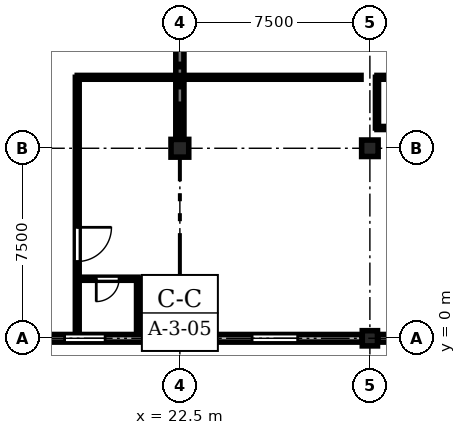
"""IFC4 building model, lengths in metres.
Left out: names, types, materials, properties, quantities, classifications, styles, units other than length and angle.
Written with IfcOpenShell. Run it as: python <this file> out.ifc"""

import sys

from ifc_helpers import new_model, si_unit, direction, frame, frame_2d, origin, origin_2d, place, context, subcontext, project, spatial, rectangle, circle, extrude, element, fill, save


model = new_model("IFC4")
c1 = context("Model", 3, precision=1e-05, world=origin(), true_north=direction((0.0, 1.0)))
c2 = subcontext(c1, "Body", "Model", "MODEL_VIEW")
j1 = project(units=[si_unit("LENGTHUNIT", "METRE"), si_unit("PLANEANGLEUNIT", "RADIAN")], contexts=[c1])
p1 = place(None, origin())
s1 = spatial("IfcSite", under=j1, at=p1, CompositionType="ELEMENT")
p2 = place(p1, origin())
s2 = spatial("IfcBuilding", under=s1, at=p2, CompositionType="ELEMENT")
p3 = place(p2, frame((0.0, 0.0, 17.85)))
s3 = spatial("IfcBuildingStorey", under=s2, at=p3, CompositionType="ELEMENT", Elevation=17.85)
p4 = place(p3, frame((22.5, 0.0, 0.0), z_axis=(0.0, 0.0, 1.0), x_axis=(1.0, 0.0, 0.0)))
e1 = element("IfcColumn", 1, at=p4, inside=s3, PredefinedType="COLUMN", context=c2, shape_type="SweptSolid", body=[
    extrude(circle(Radius=0.3, at=origin_2d()), origin(), (0.0, 0.0, 1.0), 4.05),
])
p5 = place(p3, frame((22.5, 7.5, 0.0), z_axis=(0.0, 0.0, 1.0), x_axis=(1.0, 0.0, 0.0)))
e2 = element("IfcColumn", 2, at=p5, inside=s3, PredefinedType="COLUMN", context=c2, shape_type="SweptSolid", body=[
    extrude(rectangle(XDim=0.7, YDim=0.7, at=origin_2d()), origin(), (0.0, 0.0, 1.0), 4.05),
])
p6 = place(p3, frame((30.0, 0.0, 0.0), z_axis=(0.0, 0.0, 1.0), x_axis=(1.0, 0.0, 0.0)))
e3 = element("IfcColumn", 3, at=p6, inside=s3, PredefinedType="COLUMN", context=c2, shape_type="SweptSolid", body=[
    extrude(rectangle(XDim=0.6, YDim=0.6, at=origin_2d()), origin(), (0.0, 0.0, 1.0), 4.05),
])
p7 = place(p3, frame((30.0, 7.5, 0.0), z_axis=(0.0, 0.0, 1.0), x_axis=(1.0, 0.0, 0.0)))
e4 = element("IfcColumn", 4, at=p7, inside=s3, PredefinedType="COLUMN", context=c2, shape_type="SweptSolid", body=[
    extrude(rectangle(XDim=0.65, YDim=0.65, at=origin_2d()), origin(), (0.0, 0.0, 1.0), 4.05),
])
p8 = place(p3, frame((22.5, 7.95, 0.0), z_axis=(0.0, 0.0, 1.0), x_axis=(0.0, 1.0, 0.0)))
e5 = element("IfcWall", 5, at=p8, inside=s3, PredefinedType="SHEAR", context=c2, shape_type="SweptSolid", body=[
    extrude(rectangle(XDim=6.6, YDim=0.32, at=frame_2d((3.3, 0.0))), origin(), (0.0, 0.0, 1.0), 3.22),
])
p9 = place(p3, frame((22.19, 0.0, 0.0), z_axis=(0.0, 0.0, 1.0), x_axis=(-1.0, 0.0, 0.0)))
e6 = element("IfcWall", 6, at=p9, inside=s3, PredefinedType="STANDARD", context=c2, shape_type="SweptSolid", body=[
    extrude(rectangle(XDim=6.88, YDim=0.3, at=frame_2d((3.44, 0.0))), origin(), (0.0, 0.0, 1.0), 3.17),
])
p10 = place(p9, frame((2.64, 0.0, 0.9)))
e7 = element("IfcOpeningElement", 7, at=p10, cuts=e6, PredefinedType="OPENING", context=c2, shape_type="SweptSolid", body=[
    extrude(rectangle(XDim=1.6, YDim=1.8, at=frame_2d((0.8, 0.9))), frame((0.0, 0.16, 0.0), z_axis=(0.0, -1.0, 0.0), x_axis=(1.0, 0.0, 0.0)), (0.0, 0.0, 1.0), 0.32),
])
p11 = place(p3, frame((29.69, 0.0, 0.0), z_axis=(0.0, 0.0, 1.0), x_axis=(-1.0, 0.0, 0.0)))
e8 = element("IfcWall", 8, at=p11, inside=s3, PredefinedType="STANDARD", context=c2, shape_type="SweptSolid", body=[
    extrude(rectangle(XDim=6.88, YDim=0.3, at=frame_2d((3.44, 0.0))), origin(), (0.0, 0.0, 1.0), 3.17),
])
p12 = place(p11, frame((2.54, 0.0, 0.9)))
e9 = element("IfcOpeningElement", 9, at=p12, cuts=e8, PredefinedType="OPENING", context=c2, shape_type="SweptSolid", body=[
    extrude(rectangle(XDim=1.8, YDim=1.8, at=frame_2d((0.9, 0.9))), frame((0.0, 0.16, 0.0), z_axis=(0.0, -1.0, 0.0), x_axis=(1.0, 0.0, 0.0)), (0.0, 0.0, 1.0), 0.32),
])
p13 = place(p3, frame((37.19, 0.0, 0.0), z_axis=(0.0, 0.0, 1.0), x_axis=(-1.0, 0.0, 0.0)))
e10 = element("IfcWall", 10, at=p13, inside=s3, PredefinedType="STANDARD", context=c2, shape_type="SweptSolid", body=[
    extrude(rectangle(XDim=6.88, YDim=0.3, at=frame_2d((3.44, 0.0))), origin(), (0.0, 0.0, 1.0), 3.17),
])
p14 = place(p13, frame((2.54, 0.0, 0.9)))
e11 = element("IfcOpeningElement", 11, at=p14, cuts=e10, PredefinedType="OPENING", context=c2, shape_type="SweptSolid", body=[
    extrude(rectangle(XDim=1.8, YDim=1.99, at=frame_2d((0.9, 0.995))), frame((0.0, 0.16, 0.0), z_axis=(0.0, -1.0, 0.0), x_axis=(1.0, 0.0, 0.0)), (0.0, 0.0, 1.0), 0.32),
])
p15 = place(p3, frame((18.45, 10.3, 0.0), z_axis=(0.0, 0.0, 1.0), x_axis=(0.0, -1.0, 0.0)))
e12 = element("IfcWall", 12, at=p15, inside=s3, PredefinedType="PARTITIONING", context=c2, shape_type="SweptSolid", body=[
    extrude(rectangle(XDim=9.95, YDim=0.15, at=frame_2d((4.975, 0.0))), origin(), (0.0, 0.0, 1.0), 3.755),
])
p16 = place(p15, frame((5.92, 0.0, 0.0)))
e13 = element("IfcOpeningElement", 13, at=p16, cuts=e12, PredefinedType="OPENING", context=c2, shape_type="SweptSolid", body=[
    extrude(rectangle(XDim=1.35, YDim=2.25, at=frame_2d((0.675, 1.125))), frame((0.0, 0.085, 0.0), z_axis=(0.0, -1.0, 0.0), x_axis=(1.0, 0.0, 0.0)), (0.0, 0.0, 1.0), 0.17),
])
p17 = place(p3, frame((20.85, 2.35, 0.0), z_axis=(0.0, 0.0, 1.0), x_axis=(-1.0, 0.0, 0.0)))
e14 = element("IfcWall", 14, at=p17, inside=s3, PredefinedType="PARTITIONING", context=c2, shape_type="SweptSolid", body=[
    extrude(rectangle(XDim=2.4, YDim=0.12, at=frame_2d((1.2, 0.0))), origin(), (0.0, 0.0, 1.0), 3.755),
])
p18 = place(p17, frame((0.75, 0.0, 0.0)))
e15 = element("IfcOpeningElement", 15, at=p18, cuts=e14, PredefinedType="OPENING", context=c2, shape_type="SweptSolid", body=[
    extrude(rectangle(XDim=0.9, YDim=2.1, at=frame_2d((0.45, 1.05))), frame((0.0, 0.07, 0.0), z_axis=(0.0, -1.0, 0.0), x_axis=(1.0, 0.0, 0.0)), (0.0, 0.0, 1.0), 0.14),
])
p19 = place(p3, frame((20.85, 0.35, 0.0), z_axis=(0.0, 0.0, 1.0), x_axis=(0.0, 1.0, 0.0)))
e16 = element("IfcWall", 16, at=p19, inside=s3, PredefinedType="PARTITIONING", context=c2, shape_type="SweptSolid", body=[
    extrude(rectangle(XDim=2.0, YDim=0.12, at=frame_2d((1.0, 0.0))), origin(), (0.0, 0.0, 1.0), 3.755),
])
p20 = place(p3, frame((39.937, 10.3, 0.0), z_axis=(0.0, 0.0, 1.0), x_axis=(-1.0, 0.0, 0.0)))
e17 = element("IfcWall", 17, at=p20, inside=s3, PredefinedType="PARTITIONING", context=c2, shape_type="SweptSolid", body=[
    extrude(rectangle(XDim=9.657, YDim=0.15, at=frame_2d((4.828, 0.0))), origin(), (0.0, 0.0, 1.0), 3.755),
])
p21 = place(p20, frame((4.934, 0.0, 0.0)))
e18 = element("IfcOpeningElement", 18, at=p21, cuts=e17, PredefinedType="OPENING", context=c2, shape_type="SweptSolid", body=[
    extrude(rectangle(XDim=1.35, YDim=2.25, at=frame_2d((0.675, 1.125))), frame((0.0, 0.085, 0.0), z_axis=(0.0, -1.0, 0.0), x_axis=(1.0, 0.0, 0.0)), (0.0, 0.0, 1.0), 0.17),
])
p22 = place(p3, frame((30.28, 8.3, 0.0), z_axis=(0.0, 0.0, 1.0), x_axis=(1.0, 0.0, 0.0)))
e19 = element("IfcWall", 19, at=p22, inside=s3, PredefinedType="PARTITIONING", context=c2, shape_type="SweptSolid", body=[
    extrude(rectangle(XDim=2.4, YDim=0.12, at=frame_2d((1.2, 0.0))), origin(), (0.0, 0.0, 1.0), 3.755),
])
p23 = place(p22, frame((0.75, 0.0, 0.0)))
e20 = element("IfcOpeningElement", 20, at=p23, cuts=e19, PredefinedType="OPENING", context=c2, shape_type="SweptSolid", body=[
    extrude(rectangle(XDim=0.9, YDim=2.1, at=frame_2d((0.45, 1.05))), frame((0.0, 0.07, 0.0), z_axis=(0.0, -1.0, 0.0), x_axis=(1.0, 0.0, 0.0)), (0.0, 0.0, 1.0), 0.14),
])
p24 = place(p3, frame((18.45, 10.3, 0.0), z_axis=(0.0, 0.0, 1.0), x_axis=(1.0, 0.0, 0.0)))
e21 = element("IfcWall", 21, at=p24, inside=s3, PredefinedType="PARTITIONING", context=c2, shape_type="SweptSolid", body=[
    extrude(rectangle(XDim=11.2, YDim=0.15, at=frame_2d((5.6, 0.0))), origin(), (0.0, 0.0, 1.0), 3.755),
])
p25 = place(p3, frame((30.28, 8.3, 0.0), z_axis=(0.0, 0.0, 1.0), x_axis=(0.0, 1.0, 0.0)))
e22 = element("IfcWall", 22, at=p25, inside=s3, PredefinedType="PARTITIONING", context=c2, shape_type="SweptSolid", body=[
    extrude(rectangle(XDim=2.0, YDim=0.12, at=frame_2d((1.0, 0.0))), origin(), (0.0, 0.0, 1.0), 3.255),
])
p26 = place(p10, origin())
e23 = element("IfcWindow", 23, at=p26, inside=s3, PartitioningType="SINGLE_PANEL", PredefinedType="WINDOW", context=c2, shape_type="SweptSolid", body=[
    extrude(rectangle(XDim=1.6, YDim=1.8, at=frame_2d((0.8, 0.9))), frame((0.0, 0.03, 0.0), z_axis=(0.0, -1.0, 0.0), x_axis=(1.0, 0.0, 0.0)), (0.0, 0.0, 1.0), 0.06),
])
fill(e7, e23)
p27 = place(p12, origin())
e24 = element("IfcWindow", 24, at=p27, inside=s3, PartitioningType="SINGLE_PANEL", PredefinedType="WINDOW", context=c2, shape_type="SweptSolid", body=[
    extrude(rectangle(XDim=1.8, YDim=1.8, at=frame_2d((0.9, 0.9))), frame((0.0, 0.03, 0.0), z_axis=(0.0, -1.0, 0.0), x_axis=(1.0, 0.0, 0.0)), (0.0, 0.0, 1.0), 0.06),
])
fill(e9, e24)
p28 = place(p16, origin())
e25 = element("IfcDoor", 25, at=p28, inside=s3, OperationType="SINGLE_SWING_LEFT", PredefinedType="DOOR", context=c2, shape_type="SweptSolid", body=[
    extrude(rectangle(XDim=1.35, YDim=2.25, at=frame_2d((0.675, 1.125))), frame((0.0, 0.025, 0.0), z_axis=(0.0, -1.0, 0.0), x_axis=(1.0, 0.0, 0.0)), (0.0, 0.0, 1.0), 0.05),
])
fill(e13, e25)
p29 = place(p18, origin())
e26 = element("IfcDoor", 26, at=p29, inside=s3, OperationType="SINGLE_SWING_RIGHT", PredefinedType="DOOR", context=c2, shape_type="SweptSolid", body=[
    extrude(rectangle(XDim=0.9, YDim=2.1, at=frame_2d((0.45, 1.05))), frame((0.0, 0.025, 0.0), z_axis=(0.0, -1.0, 0.0), x_axis=(1.0, 0.0, 0.0)), (0.0, 0.0, 1.0), 0.05),
])
fill(e15, e26)
save(model, sys.argv[1])
